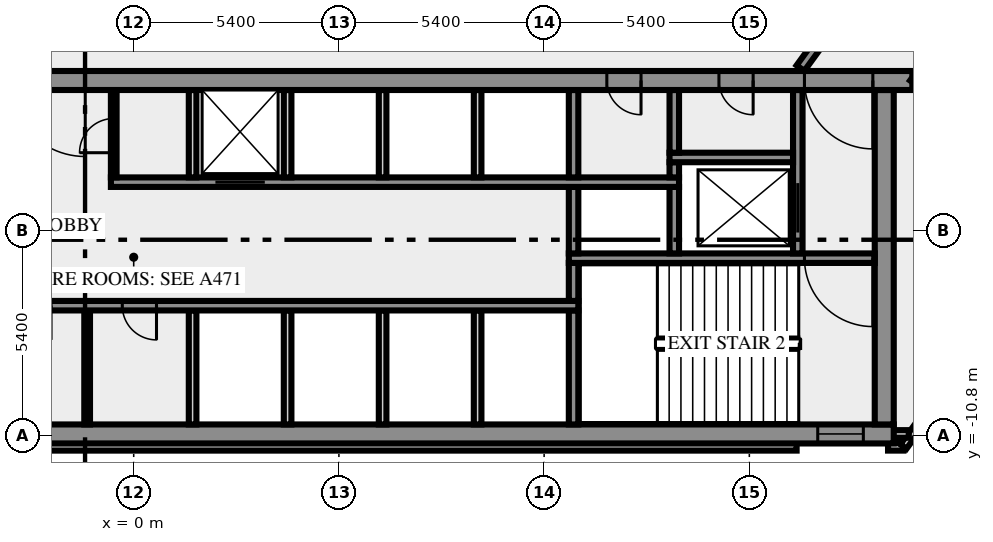
"""IFC4 building model, lengths in metres.
Left out: names, types, materials, properties, quantities, classifications, styles, units other than length and angle.
Written with IfcOpenShell. Run it as: python <this file> out.ifc"""

import sys

from ifc_helpers import new_model, si_unit, direction, frame, frame_2d, origin, place, context, subcontext, project, spatial, rectangle, extrude, element, fill, save


model = new_model("IFC4")
c1 = context("Model", 3, precision=1e-05, world=origin(), true_north=direction((0.0, 1.0)))
c2 = subcontext(c1, "Body", "Model", "MODEL_VIEW")
j1 = project(units=[si_unit("LENGTHUNIT", "METRE"), si_unit("PLANEANGLEUNIT", "RADIAN")], contexts=[c1])
p1 = place(None, origin())
s1 = spatial("IfcSite", under=j1, at=p1, CompositionType="ELEMENT")
p2 = place(p1, origin())
s2 = spatial("IfcBuilding", under=s1, at=p2, CompositionType="ELEMENT")
p3 = place(p2, frame((0.0, 0.0, 113.0)))
s3 = spatial("IfcBuildingStorey", under=s2, at=p3, CompositionType="ELEMENT", Elevation=113.0)
p4 = place(p3, frame((-17.444, -11.088, 0.0), z_axis=(0.0, 0.0, 1.0), x_axis=(1.0, 0.0, 0.0)))
e1 = element("IfcWall", 1, at=p4, inside=s3, PredefinedType="SOLIDWALL", context=c2, shape_type="SweptSolid", body=[
    extrude(rectangle(XDim=34.888, YDim=0.2, at=frame_2d((17.444, 0.0))), origin(), (0.0, 0.0, 1.0), 3.65),
])
p5 = place(p3, frame((19.85, -11.088, 0.0), z_axis=(0.0, 0.0, 1.0), x_axis=(1.0, 0.0, 0.0)))
e2 = element("IfcWall", 2, at=p5, inside=s3, PredefinedType="SOLIDWALL", context=c2, shape_type="SweptSolid", body=[
    extrude(rectangle(XDim=0.406, YDim=0.2, at=frame_2d((0.203, 0.0))), origin(), (0.0, 0.0, 1.0), 3.65),
])
p6 = place(p3, frame((20.253, -11.083, 0.0), z_axis=(0.0, 0.0, 1.0), x_axis=(0.587766567315, 0.809030569476, 0.0)))
e3 = element("IfcWall", 3, at=p6, inside=s3, PredefinedType="SOLIDWALL", context=c2, shape_type="SweptSolid", body=[
    extrude(rectangle(XDim=2.688, YDim=0.2, at=frame_2d((1.344, 0.0))), origin(), (0.0, 0.0, 1.0), 3.65),
])
p7 = place(p3, frame((19.98, -10.75, 0.0), z_axis=(0.0, 0.0, 1.0), x_axis=(1.0, 0.0, 0.0)))
e4 = element("IfcWall", 4, at=p7, inside=s3, PredefinedType="SOLIDWALL", context=c2, shape_type="SweptSolid", body=[
    extrude(rectangle(XDim=0.417, YDim=0.2, at=frame_2d((0.208, 0.0))), origin(), (0.0, 0.0, 1.0), 3.65),
])
p8 = place(p3, frame((-20.0, -10.75, 0.0), z_axis=(0.0, 0.0, 1.0), x_axis=(1.0, 0.0, 0.0)))
e5 = element("IfcWall", 5, at=p8, inside=s3, PredefinedType="SHEAR", context=c2, shape_type="SweptSolid", body=[
    extrude(rectangle(XDim=40.0, YDim=0.5, at=frame_2d((20.0, 0.0))), origin(), (0.0, 0.0, 1.0), 3.65),
])
p9 = place(p8, frame((0.8, 0.0, 1.0)))
e6 = element("IfcOpeningElement", 6, at=p9, cuts=e5, PredefinedType="OPENING", context=c2, shape_type="SweptSolid", body=[
    extrude(rectangle(XDim=1.2, YDim=1.2, at=frame_2d((0.6, 0.6))), frame((0.0, 0.26, 0.0), z_axis=(0.0, -1.0, 0.0), x_axis=(1.0, 0.0, 0.0)), (0.0, 0.0, 1.0), 0.52),
])
p10 = place(p8, frame((38.0, 0.0, 1.0)))
e7 = element("IfcOpeningElement", 7, at=p10, cuts=e5, PredefinedType="OPENING", context=c2, shape_type="SweptSolid", body=[
    extrude(rectangle(XDim=1.2, YDim=1.2, at=frame_2d((0.6, 0.6))), frame((0.0, 0.26, 0.0), z_axis=(0.0, -1.0, 0.0), x_axis=(1.0, 0.0, 0.0)), (0.0, 0.0, 1.0), 0.52),
])
p11 = place(p3, frame((-1.225, -10.5, 0.0), z_axis=(0.0, 0.0, 1.0), x_axis=(0.0, 1.0, 0.0)))
e8 = element("IfcWall", 8, at=p11, inside=s3, PredefinedType="PARTITIONING", context=c2, shape_type="SweptSolid", body=[
    extrude(rectangle(XDim=3.0, YDim=0.15, at=frame_2d((1.5, 0.0))), origin(), (0.0, 0.0, 1.0), 3.65),
])
for number, where, z_axis, x_axis in (
    (9, (1.55, -10.5, 0.0), (0.0, 0.0, 1.0), (0.0, 1.0, 0.0)),
    (10, (4.05, -10.5, 0.0), (0.0, 0.0, 1.0), (0.0, 1.0, 0.0)),
    (11, (6.55, -10.5, 0.0), (0.0, 0.0, 1.0), (0.0, 1.0, 0.0)),
    (12, (9.05, -10.5, 0.0), (0.0, 0.0, 1.0), (0.0, 1.0, 0.0)),
):
    element("IfcWall", number, at=place(p3, frame(where, z_axis=z_axis, x_axis=x_axis)), inside=s3, PredefinedType="SOLIDWALL", context=c2, shape_type="SweptSolid", body=[
        extrude(rectangle(XDim=3.0, YDim=0.2, at=frame_2d((1.5, 0.0))), origin(), (0.0, 0.0, 1.0), 3.65),
    ])
p12 = place(p3, frame((11.575, -10.5, 0.0), z_axis=(0.0, 0.0, 1.0), x_axis=(0.0, 1.0, 0.0)))
e13 = element("IfcWall", 13, at=p12, inside=s3, PredefinedType="SHEAR", context=c2, shape_type="SweptSolid", body=[
    extrude(rectangle(XDim=3.0, YDim=0.25, at=frame_2d((1.5, 0.0))), origin(), (0.0, 0.0, 1.0), 3.65),
])
p13 = place(p3, frame((19.75, -10.5, 0.0), z_axis=(0.0, 0.0, 1.0), x_axis=(0.0, 1.0, 0.0)))
e14 = element("IfcWall", 14, at=p13, inside=s3, PredefinedType="SHEAR", context=c2, shape_type="SweptSolid", body=[
    extrude(rectangle(XDim=8.8, YDim=0.5, at=frame_2d((4.4, 0.0))), origin(), (0.0, 0.0, 1.0), 3.65),
])
p14 = place(p3, frame((11.7, -7.375, 0.0), z_axis=(0.0, 0.0, 1.0), x_axis=(-1.0, 0.0, 0.0)))
e15 = element("IfcWall", 15, at=p14, inside=s3, PredefinedType="SHEAR", context=c2, shape_type="SweptSolid", body=[
    extrude(rectangle(XDim=23.4, YDim=0.25, at=frame_2d((11.7, 0.0))), origin(), (0.0, 0.0, 1.0), 3.65),
])
p15 = place(p14, frame((21.45, 0.0, 0.0)))
e16 = element("IfcOpeningElement", 16, at=p15, cuts=e15, PredefinedType="OPENING", context=c2, shape_type="SweptSolid", body=[
    extrude(rectangle(XDim=1.1, YDim=2.1, at=frame_2d((0.55, 1.05))), frame((0.0, 0.135, 0.0), z_axis=(0.0, -1.0, 0.0), x_axis=(1.0, 0.0, 0.0)), (0.0, 0.0, 1.0), 0.27),
])
p16 = place(p14, frame((18.95, 0.0, 0.0)))
e17 = element("IfcOpeningElement", 17, at=p16, cuts=e15, PredefinedType="OPENING", context=c2, shape_type="SweptSolid", body=[
    extrude(rectangle(XDim=1.1, YDim=2.1, at=frame_2d((0.55, 1.05))), frame((0.0, 0.135, 0.0), z_axis=(0.0, -1.0, 0.0), x_axis=(1.0, 0.0, 0.0)), (0.0, 0.0, 1.0), 0.27),
])
p17 = place(p14, frame((16.45, 0.0, 0.0)))
e18 = element("IfcOpeningElement", 18, at=p17, cuts=e15, PredefinedType="OPENING", context=c2, shape_type="SweptSolid", body=[
    extrude(rectangle(XDim=1.1, YDim=2.1, at=frame_2d((0.55, 1.05))), frame((0.0, 0.135, 0.0), z_axis=(0.0, -1.0, 0.0), x_axis=(1.0, 0.0, 0.0)), (0.0, 0.0, 1.0), 0.27),
])
p18 = place(p14, frame((13.875, 0.0, 0.0)))
e19 = element("IfcOpeningElement", 19, at=p18, cuts=e15, PredefinedType="OPENING", context=c2, shape_type="SweptSolid", body=[
    extrude(rectangle(XDim=0.9, YDim=2.1, at=frame_2d((0.45, 1.05))), frame((0.0, 0.135, 0.0), z_axis=(0.0, -1.0, 0.0), x_axis=(1.0, 0.0, 0.0)), (0.0, 0.0, 1.0), 0.27),
])
p19 = place(p14, frame((11.1, 0.0, 0.0)))
e20 = element("IfcOpeningElement", 20, at=p19, cuts=e15, PredefinedType="OPENING", context=c2, shape_type="SweptSolid", body=[
    extrude(rectangle(XDim=0.9, YDim=2.1, at=frame_2d((0.45, 1.05))), frame((0.0, 0.135, 0.0), z_axis=(0.0, -1.0, 0.0), x_axis=(1.0, 0.0, 0.0)), (0.0, 0.0, 1.0), 0.27),
])
p20 = place(p3, frame((11.575, -7.25, 0.0), z_axis=(0.0, 0.0, 1.0), x_axis=(0.0, 1.0, 0.0)))
e21 = element("IfcWall", 21, at=p20, inside=s3, PredefinedType="SHEAR", context=c2, shape_type="SweptSolid", body=[
    extrude(rectangle(XDim=1.0, YDim=0.25, at=frame_2d((0.5, 0.0))), origin(), (0.0, 0.0, 1.0), 3.65),
])
p21 = place(p3, frame((19.5, -6.125, 0.0), z_axis=(0.0, 0.0, 1.0), x_axis=(-1.0, 0.0, 0.0)))
e22 = element("IfcWall", 22, at=p21, inside=s3, PredefinedType="SHEAR", context=c2, shape_type="SweptSolid", body=[
    extrude(rectangle(XDim=8.05, YDim=0.25, at=frame_2d((4.025, 0.0))), origin(), (0.0, 0.0, 1.0), 3.65),
])
p22 = place(p21, frame((0.05, 0.0, 0.0)))
e23 = element("IfcOpeningElement", 23, at=p22, cuts=e22, PredefinedType="OPENING", context=c2, shape_type="SweptSolid", body=[
    extrude(rectangle(XDim=1.8, YDim=2.1, at=frame_2d((0.9, 1.05))), frame((0.0, 0.135, 0.0), z_axis=(0.0, -1.0, 0.0), x_axis=(1.0, 0.0, 0.0)), (0.0, 0.0, 1.0), 0.27),
])
for number, where, z_axis, x_axis in (
    (24, (11.575, -6.0, 0.0), (0.0, 0.0, 1.0), (0.0, 1.0, 0.0)),
    (25, (14.225, -6.0, 0.0), (0.0, 0.0, 1.0), (0.0, 1.0, 0.0)),
):
    element("IfcWall", number, at=place(p3, frame(where, z_axis=z_axis, x_axis=x_axis)), inside=s3, PredefinedType="SHEAR", context=c2, shape_type="SweptSolid", body=[
        extrude(rectangle(XDim=1.75, YDim=0.25, at=frame_2d((0.875, 0.0))), origin(), (0.0, 0.0, 1.0), 3.65),
    ])
p23 = place(p3, frame((17.475, -6.0, 0.0), z_axis=(0.0, 0.0, 1.0), x_axis=(0.0, 1.0, 0.0)))
e26 = element("IfcWall", 26, at=p23, inside=s3, PredefinedType="SHEAR", context=c2, shape_type="SweptSolid", body=[
    extrude(rectangle(XDim=4.3, YDim=0.25, at=frame_2d((2.15, 0.0))), origin(), (0.0, 0.0, 1.0), 3.65),
])
p24 = place(p23, frame((0.55, 0.0, 0.0)))
e27 = element("IfcOpeningElement", 27, at=p24, cuts=e26, PredefinedType="OPENING", context=c2, shape_type="SweptSolid", body=[
    extrude(rectangle(XDim=1.3, YDim=2.1, at=frame_2d((0.65, 1.05))), frame((0.0, 0.135, 0.0), z_axis=(0.0, -1.0, 0.0), x_axis=(1.0, 0.0, 0.0)), (0.0, 0.0, 1.0), 0.27),
])
p25 = place(p3, frame((-0.6, -4.125, 0.0), z_axis=(0.0, 0.0, 1.0), x_axis=(1.0, 0.0, 0.0)))
e28 = element("IfcWall", 28, at=p25, inside=s3, PredefinedType="SHEAR", context=c2, shape_type="SweptSolid", body=[
    extrude(rectangle(XDim=14.95, YDim=0.25, at=frame_2d((7.475, 0.0))), origin(), (0.0, 0.0, 1.0), 3.65),
])
p26 = place(p25, frame((2.75, 0.0, 0.0)))
e29 = element("IfcOpeningElement", 29, at=p26, cuts=e28, PredefinedType="OPENING", context=c2, shape_type="SweptSolid", body=[
    extrude(rectangle(XDim=1.3, YDim=2.1, at=frame_2d((0.65, 1.05))), frame((0.0, 0.135, 0.0), z_axis=(0.0, -1.0, 0.0), x_axis=(1.0, 0.0, 0.0)), (0.0, 0.0, 1.0), 0.27),
])
p27 = place(p3, frame((-0.525, -4.0, 0.0), z_axis=(0.0, 0.0, 1.0), x_axis=(0.0, 1.0, 0.0)))
e30 = element("IfcWall", 30, at=p27, inside=s3, PredefinedType="PARTITIONING", context=c2, shape_type="SweptSolid", body=[
    extrude(rectangle(XDim=2.3, YDim=0.15, at=frame_2d((1.15, 0.0))), origin(), (0.0, 0.0, 1.0), 3.65),
])
p28 = place(p27, frame((0.65, 0.0, 0.0)))
e31 = element("IfcOpeningElement", 31, at=p28, cuts=e30, PredefinedType="OPENING", context=c2, shape_type="SweptSolid", body=[
    extrude(rectangle(XDim=0.9, YDim=2.1, at=frame_2d((0.45, 1.05))), frame((0.0, 0.085, 0.0), z_axis=(0.0, -1.0, 0.0), x_axis=(1.0, 0.0, 0.0)), (0.0, 0.0, 1.0), 0.17),
])
for number, where, z_axis, x_axis in (
    (32, (1.55, -4.0, 0.0), (0.0, 0.0, 1.0), (0.0, 1.0, 0.0)),
    (33, (4.05, -4.0, 0.0), (0.0, 0.0, 1.0), (0.0, 1.0, 0.0)),
    (34, (6.55, -4.0, 0.0), (0.0, 0.0, 1.0), (0.0, 1.0, 0.0)),
    (35, (9.05, -4.0, 0.0), (0.0, 0.0, 1.0), (0.0, 1.0, 0.0)),
):
    element("IfcWall", number, at=place(p3, frame(where, z_axis=z_axis, x_axis=x_axis)), inside=s3, PredefinedType="SOLIDWALL", context=c2, shape_type="SweptSolid", body=[
        extrude(rectangle(XDim=2.3, YDim=0.2, at=frame_2d((1.15, 0.0))), origin(), (0.0, 0.0, 1.0), 3.65),
    ])
p29 = place(p3, frame((11.575, -4.0, 0.0), z_axis=(0.0, 0.0, 1.0), x_axis=(0.0, 1.0, 0.0)))
e36 = element("IfcWall", 36, at=p29, inside=s3, PredefinedType="SHEAR", context=c2, shape_type="SweptSolid", body=[
    extrude(rectangle(XDim=2.3, YDim=0.25, at=frame_2d((1.15, 0.0))), origin(), (0.0, 0.0, 1.0), 3.65),
])
p30 = place(p3, frame((14.225, -4.0, 0.0), z_axis=(0.0, 0.0, 1.0), x_axis=(0.0, 1.0, 0.0)))
e37 = element("IfcWall", 37, at=p30, inside=s3, PredefinedType="SHEAR", context=c2, shape_type="SweptSolid", body=[
    extrude(rectangle(XDim=0.4, YDim=0.25, at=frame_2d((0.2, 0.0))), origin(), (0.0, 0.0, 1.0), 3.65),
])
p31 = place(p3, frame((14.1, -3.475, 0.0), z_axis=(0.0, 0.0, 1.0), x_axis=(1.0, 0.0, 0.0)))
e38 = element("IfcWall", 38, at=p31, inside=s3, PredefinedType="SHEAR", context=c2, shape_type="SweptSolid", body=[
    extrude(rectangle(XDim=3.25, YDim=0.25, at=frame_2d((1.625, 0.0))), origin(), (0.0, 0.0, 1.0), 3.65),
])
p32 = place(p3, frame((14.225, -3.35, 0.0), z_axis=(0.0, 0.0, 1.0), x_axis=(0.0, 1.0, 0.0)))
e39 = element("IfcWall", 39, at=p32, inside=s3, PredefinedType="SHEAR", context=c2, shape_type="SweptSolid", body=[
    extrude(rectangle(XDim=1.65, YDim=0.25, at=frame_2d((0.825, 0.0))), origin(), (0.0, 0.0, 1.0), 3.65),
])
p33 = place(p3, frame((20.49, -1.45, 0.0), z_axis=(0.0, 0.0, 1.0), x_axis=(-1.0, 0.0, 0.0)))
e40 = element("IfcWall", 40, at=p33, inside=s3, PredefinedType="SHEAR", context=c2, shape_type="SweptSolid", body=[
    extrude(rectangle(XDim=40.98, YDim=0.5, at=frame_2d((20.49, 0.0))), origin(), (0.0, 0.0, 1.0), 3.65),
])
p34 = place(p33, frame((38.14, 0.0, 0.0)))
e41 = element("IfcOpeningElement", 41, at=p34, cuts=e40, PredefinedType="OPENING", context=c2, shape_type="SweptSolid", body=[
    extrude(rectangle(XDim=1.8, YDim=2.1, at=frame_2d((0.9, 1.05))), frame((0.0, 0.26, 0.0), z_axis=(0.0, -1.0, 0.0), x_axis=(1.0, 0.0, 0.0)), (0.0, 0.0, 1.0), 0.52),
])
p35 = place(p33, frame((36.728, 0.0, 0.0)))
e42 = element("IfcOpeningElement", 42, at=p35, cuts=e40, PredefinedType="OPENING", context=c2, shape_type="SweptSolid", body=[
    extrude(rectangle(XDim=0.8, YDim=2.1, at=frame_2d((0.4, 1.05))), frame((0.0, 0.26, 0.0), z_axis=(0.0, -1.0, 0.0), x_axis=(1.0, 0.0, 0.0)), (0.0, 0.0, 1.0), 0.52),
])
p36 = place(p33, frame((35.153, 0.0, 0.0)))
e43 = element("IfcOpeningElement", 43, at=p36, cuts=e40, PredefinedType="OPENING", context=c2, shape_type="SweptSolid", body=[
    extrude(rectangle(XDim=0.8, YDim=2.1, at=frame_2d((0.4, 1.05))), frame((0.0, 0.26, 0.0), z_axis=(0.0, -1.0, 0.0), x_axis=(1.0, 0.0, 0.0)), (0.0, 0.0, 1.0), 0.52),
])
p37 = place(p33, frame((32.94, 0.0, 0.0)))
e44 = element("IfcOpeningElement", 44, at=p37, cuts=e40, PredefinedType="OPENING", context=c2, shape_type="SweptSolid", body=[
    extrude(rectangle(XDim=0.9, YDim=2.1, at=frame_2d((0.45, 1.05))), frame((0.0, 0.26, 0.0), z_axis=(0.0, -1.0, 0.0), x_axis=(1.0, 0.0, 0.0)), (0.0, 0.0, 1.0), 0.52),
])
p38 = place(p33, frame((21.765, 0.0, 0.0)))
e45 = element("IfcOpeningElement", 45, at=p38, cuts=e40, PredefinedType="OPENING", context=c2, shape_type="SweptSolid", body=[
    extrude(rectangle(XDim=2.0, YDim=2.1, at=frame_2d((1.0, 1.05))), frame((0.0, 0.26, 0.0), z_axis=(0.0, -1.0, 0.0), x_axis=(1.0, 0.0, 0.0)), (0.0, 0.0, 1.0), 0.52),
])
p39 = place(p33, frame((7.14, 0.0, 0.0)))
e46 = element("IfcOpeningElement", 46, at=p39, cuts=e40, PredefinedType="OPENING", context=c2, shape_type="SweptSolid", body=[
    extrude(rectangle(XDim=0.9, YDim=2.1, at=frame_2d((0.45, 1.05))), frame((0.0, 0.26, 0.0), z_axis=(0.0, -1.0, 0.0), x_axis=(1.0, 0.0, 0.0)), (0.0, 0.0, 1.0), 0.52),
])
p40 = place(p33, frame((4.19, 0.0, 0.0)))
e47 = element("IfcOpeningElement", 47, at=p40, cuts=e40, PredefinedType="OPENING", context=c2, shape_type="SweptSolid", body=[
    extrude(rectangle(XDim=0.9, YDim=2.1, at=frame_2d((0.45, 1.05))), frame((0.0, 0.26, 0.0), z_axis=(0.0, -1.0, 0.0), x_axis=(1.0, 0.0, 0.0)), (0.0, 0.0, 1.0), 0.52),
])
p41 = place(p33, frame((1.04, 0.0, 0.0)))
e48 = element("IfcOpeningElement", 48, at=p41, cuts=e40, PredefinedType="OPENING", context=c2, shape_type="SweptSolid", body=[
    extrude(rectangle(XDim=1.8, YDim=2.1, at=frame_2d((0.9, 1.05))), frame((0.0, 0.26, 0.0), z_axis=(0.0, -1.0, 0.0), x_axis=(1.0, 0.0, 0.0)), (0.0, 0.0, 1.0), 0.52),
])
p42 = place(p3, frame((40.463, 25.911, 0.0), z_axis=(0.0, 0.0, 1.0), x_axis=(-0.587781654618, -0.809019608226, 0.0)))
e49 = element("IfcWall", 49, at=p42, inside=s3, PredefinedType="SOLIDWALL", context=c2, shape_type="SweptSolid", body=[
    extrude(rectangle(XDim=33.911, YDim=0.25, at=frame_2d((16.956, 0.0))), origin(), (0.0, 0.0, 1.0), 3.65),
])
p43 = place(p42, frame((21.396, 0.0, 0.0)))
e50 = element("IfcOpeningElement", 50, at=p43, cuts=e49, PredefinedType="OPENING", context=c2, shape_type="SweptSolid", body=[
    extrude(rectangle(XDim=0.9, YDim=2.1, at=frame_2d((0.45, 1.05))), frame((0.0, 0.135, 0.0), z_axis=(0.0, -1.0, 0.0), x_axis=(1.0, 0.0, 0.0)), (0.0, 0.0, 1.0), 0.27),
])
p44 = place(p42, frame((19.795, 0.0, 0.0)))
e51 = element("IfcOpeningElement", 51, at=p44, cuts=e49, PredefinedType="OPENING", context=c2, shape_type="SweptSolid", body=[
    extrude(rectangle(XDim=0.9, YDim=2.1, at=frame_2d((0.45, 1.05))), frame((0.0, 0.135, 0.0), z_axis=(0.0, -1.0, 0.0), x_axis=(1.0, 0.0, 0.0)), (0.0, 0.0, 1.0), 0.27),
])
p45 = place(p3, frame((17.545, -1.125, 0.0), z_axis=(0.0, 0.0, 1.0), x_axis=(0.587788021768, 0.809014982226, 0.0)))
e52 = element("IfcWall", 52, at=p45, inside=s3, PredefinedType="SOLIDWALL", context=c2, shape_type="SweptSolid", body=[
    extrude(rectangle(XDim=35.344, YDim=0.25, at=frame_2d((17.672, 0.0))), origin(), (0.0, 0.0, 1.0), 3.65),
])
p46 = place(p45, frame((17.508, 0.0, 0.0)))
e53 = element("IfcOpeningElement", 53, at=p46, cuts=e52, PredefinedType="OPENING", context=c2, shape_type="SweptSolid", body=[
    extrude(rectangle(XDim=0.9, YDim=2.1, at=frame_2d((0.45, 1.05))), frame((0.0, 0.135, 0.0), z_axis=(0.0, -1.0, 0.0), x_axis=(1.0, 0.0, 0.0)), (0.0, 0.0, 1.0), 0.27),
])
p47 = place(p45, frame((21.808, 0.0, 0.0)))
e54 = element("IfcOpeningElement", 54, at=p47, cuts=e52, PredefinedType="OPENING", context=c2, shape_type="SweptSolid", body=[
    extrude(rectangle(XDim=0.9, YDim=2.1, at=frame_2d((0.45, 1.05))), frame((0.0, 0.135, 0.0), z_axis=(0.0, -1.0, 0.0), x_axis=(1.0, 0.0, 0.0)), (0.0, 0.0, 1.0), 0.27),
])
p48 = place(p45, frame((19.108, 0.0, 0.0)))
e55 = element("IfcOpeningElement", 55, at=p48, cuts=e52, PredefinedType="OPENING", context=c2, shape_type="SweptSolid", body=[
    extrude(rectangle(XDim=0.9, YDim=2.1, at=frame_2d((0.45, 1.05))), frame((0.0, 0.135, 0.0), z_axis=(0.0, -1.0, 0.0), x_axis=(1.0, 0.0, 0.0)), (0.0, 0.0, 1.0), 0.27),
])
p49 = place(p10, origin())
e56 = element("IfcWindow", 56, at=p49, inside=s3, PartitioningType="SINGLE_PANEL", PredefinedType="WINDOW", context=c2, shape_type="SweptSolid", body=[
    extrude(rectangle(XDim=1.2, YDim=1.2, at=frame_2d((0.6, 0.6))), frame((0.0, 0.03, 0.0), z_axis=(0.0, -1.0, 0.0), x_axis=(1.0, 0.0, 0.0)), (0.0, 0.0, 1.0), 0.06),
])
fill(e7, e56)
p50 = place(p19, origin())
e57 = element("IfcDoor", 57, at=p50, inside=s3, OperationType="SINGLE_SWING_LEFT", PredefinedType="DOOR", context=c2, shape_type="SweptSolid", body=[
    extrude(rectangle(XDim=0.9, YDim=2.1, at=frame_2d((0.45, 1.05))), frame((0.0, 0.025, 0.0), z_axis=(0.0, -1.0, 0.0), x_axis=(1.0, 0.0, 0.0)), (0.0, 0.0, 1.0), 0.05),
])
fill(e20, e57)
p51 = place(p22, origin())
e58 = element("IfcDoor", 58, at=p51, inside=s3, OperationType="DOUBLE_DOOR_SINGLE_SWING", PredefinedType="DOOR", context=c2, shape_type="SweptSolid", body=[
    extrude(rectangle(XDim=1.8, YDim=2.1, at=frame_2d((0.9, 1.05))), frame((0.0, 0.025, 0.0), z_axis=(0.0, -1.0, 0.0), x_axis=(1.0, 0.0, 0.0)), (0.0, 0.0, 1.0), 0.05),
])
fill(e23, e58)
p52 = place(p24, origin())
e59 = element("IfcDoor", 59, at=p52, inside=s3, OperationType="DOUBLE_DOOR_SLIDING", PredefinedType="DOOR", context=c2, shape_type="SweptSolid", body=[
    extrude(rectangle(XDim=1.3, YDim=2.1, at=frame_2d((0.65, 1.05))), frame((0.0, 0.025, 0.0), z_axis=(0.0, -1.0, 0.0), x_axis=(1.0, 0.0, 0.0)), (0.0, 0.0, 1.0), 0.05),
])
fill(e27, e59)
p53 = place(p26, origin())
e60 = element("IfcDoor", 60, at=p53, inside=s3, OperationType="DOUBLE_DOOR_SLIDING", PredefinedType="DOOR", context=c2, shape_type="SweptSolid", body=[
    extrude(rectangle(XDim=1.3, YDim=2.1, at=frame_2d((0.65, 1.05))), frame((0.0, 0.025, 0.0), z_axis=(0.0, -1.0, 0.0), x_axis=(1.0, 0.0, 0.0)), (0.0, 0.0, 1.0), 0.05),
])
fill(e29, e60)
p54 = place(p28, origin())
e61 = element("IfcDoor", 61, at=p54, inside=s3, OperationType="SINGLE_SWING_LEFT", PredefinedType="DOOR", context=c2, shape_type="SweptSolid", body=[
    extrude(rectangle(XDim=0.9, YDim=2.1, at=frame_2d((0.45, 1.05))), frame((0.0, 0.025, 0.0), z_axis=(0.0, -1.0, 0.0), x_axis=(1.0, 0.0, 0.0)), (0.0, 0.0, 1.0), 0.05),
])
fill(e31, e61)
p55 = place(p38, origin())
e62 = element("IfcDoor", 62, at=p55, inside=s3, OperationType="DOUBLE_DOOR_SINGLE_SWING", PredefinedType="DOOR", context=c2, shape_type="SweptSolid", body=[
    extrude(rectangle(XDim=2.0, YDim=2.1, at=frame_2d((1.0, 1.05))), frame((0.0, 0.025, 0.0), z_axis=(0.0, -1.0, 0.0), x_axis=(1.0, 0.0, 0.0)), (0.0, 0.0, 1.0), 0.05),
])
fill(e45, e62)
p56 = place(p39, origin())
e63 = element("IfcDoor", 63, at=p56, inside=s3, OperationType="SINGLE_SWING_LEFT", PredefinedType="DOOR", context=c2, shape_type="SweptSolid", body=[
    extrude(rectangle(XDim=0.9, YDim=2.1, at=frame_2d((0.45, 1.05))), frame((0.0, 0.025, 0.0), z_axis=(0.0, -1.0, 0.0), x_axis=(1.0, 0.0, 0.0)), (0.0, 0.0, 1.0), 0.05),
])
fill(e46, e63)
p57 = place(p40, origin())
e64 = element("IfcDoor", 64, at=p57, inside=s3, OperationType="SINGLE_SWING_LEFT", PredefinedType="DOOR", context=c2, shape_type="SweptSolid", body=[
    extrude(rectangle(XDim=0.9, YDim=2.1, at=frame_2d((0.45, 1.05))), frame((0.0, 0.025, 0.0), z_axis=(0.0, -1.0, 0.0), x_axis=(1.0, 0.0, 0.0)), (0.0, 0.0, 1.0), 0.05),
])
fill(e47, e64)
p58 = place(p41, origin())
e65 = element("IfcDoor", 65, at=p58, inside=s3, OperationType="DOUBLE_DOOR_SINGLE_SWING", PredefinedType="DOOR", context=c2, shape_type="SweptSolid", body=[
    extrude(rectangle(XDim=1.8, YDim=2.1, at=frame_2d((0.9, 1.05))), frame((0.0, 0.025, 0.0), z_axis=(0.0, -1.0, 0.0), x_axis=(1.0, 0.0, 0.0)), (0.0, 0.0, 1.0), 0.05),
])
fill(e48, e65)
save(model, sys.argv[1])
